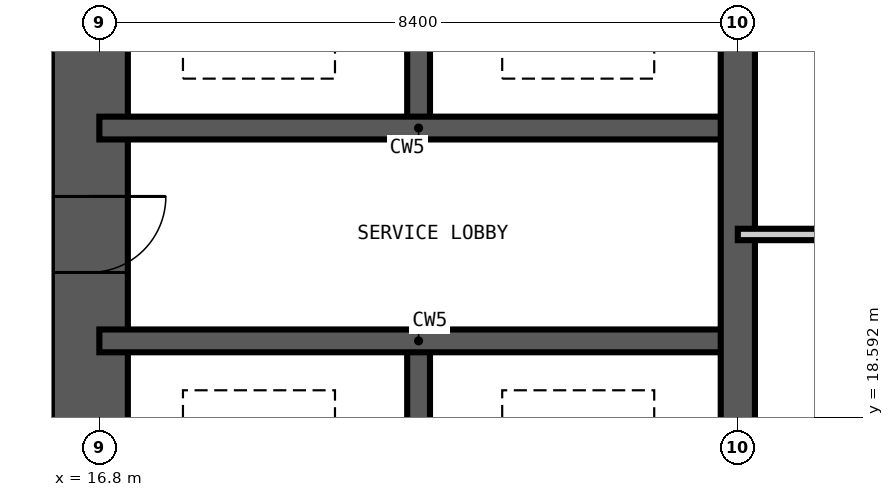
"""IFC4 building model, lengths in metres.
Left out: names, types, materials, properties, quantities, classifications, styles, units other than length and angle.
Written with IfcOpenShell. Run it as: python <this file> out.ifc"""

import sys

from ifc_helpers import new_model, si_unit, direction, frame, frame_2d, origin, place, context, subcontext, project, spatial, rectangle, extrude, element, fill, save


model = new_model("IFC4")
c1 = context("Model", 3, precision=1e-05, world=origin(), true_north=direction((0.0, 1.0)))
c2 = subcontext(c1, "Body", "Model", "MODEL_VIEW")
j1 = project(units=[si_unit("LENGTHUNIT", "METRE"), si_unit("PLANEANGLEUNIT", "RADIAN")], contexts=[c1])
p1 = place(None, origin())
s1 = spatial("IfcSite", under=j1, at=p1, CompositionType="ELEMENT")
p2 = place(p1, origin())
s2 = spatial("IfcBuilding", under=s1, at=p2, CompositionType="ELEMENT")
p3 = place(p2, frame((0.0, 0.0, 118.8)))
s3 = spatial("IfcBuildingStorey", under=s2, at=p3, CompositionType="ELEMENT", Elevation=118.8)
p4 = place(p3, frame((16.675, 41.625, -0.35), z_axis=(0.0, 0.0, 1.0), x_axis=(0.0, -1.0, 0.0)))
e1 = element("IfcWall", 1, at=p4, inside=s3, PredefinedType="SHEAR", context=c2, shape_type="SweptSolid", body=[
    extrude(rectangle(XDim=24.45, YDim=1.0, at=frame_2d((12.225, 0.0))), origin(), (0.0, 0.0, 1.0), 3.6),
])
p5 = place(p4, frame((11.325, 0.0, 0.35)))
e2 = element("IfcOpeningElement", 2, at=p5, cuts=e1, PredefinedType="OPENING", context=c2, shape_type="SweptSolid", body=[
    extrude(rectangle(XDim=1.8, YDim=2.2, at=frame_2d((0.9, 1.1))), frame((0.0, 0.51, 0.0), z_axis=(0.0, -1.0, 0.0), x_axis=(1.0, 0.0, 0.0)), (0.0, 0.0, 1.0), 1.02),
])
p6 = place(p4, frame((20.125, 0.0, 0.35)))
e3 = element("IfcOpeningElement", 3, at=p6, cuts=e1, PredefinedType="OPENING", context=c2, shape_type="SweptSolid", body=[
    extrude(rectangle(XDim=1.0, YDim=2.1, at=frame_2d((0.5, 1.05))), frame((0.0, 0.51, 0.0), z_axis=(0.0, -1.0, 0.0), x_axis=(1.0, 0.0, 0.0)), (0.0, 0.0, 1.0), 1.02),
])
p7 = place(p4, frame((5.425, 0.0, 0.35)))
e4 = element("IfcOpeningElement", 4, at=p7, cuts=e1, PredefinedType="OPENING", context=c2, shape_type="SweptSolid", body=[
    extrude(rectangle(XDim=1.0, YDim=2.1, at=frame_2d((0.5, 1.05))), frame((0.0, 0.51, 0.0), z_axis=(0.0, -1.0, 0.0), x_axis=(1.0, 0.0, 0.0)), (0.0, 0.0, 1.0), 1.02),
])
p8 = place(p3, frame((21.0, 16.8, -0.35), z_axis=(0.0, 0.0, 1.0), x_axis=(0.0, 1.0, 0.0)))
e5 = element("IfcWall", 5, at=p8, inside=s3, PredefinedType="SHEAR", context=c2, shape_type="SweptSolid", body=[
    extrude(rectangle(XDim=2.8, YDim=0.3, at=frame_2d((1.4, 0.0))), origin(), (0.0, 0.0, 1.0), 3.6),
])
p9 = place(p3, frame((21.0, 22.4, -0.35), z_axis=(0.0, 0.0, 1.0), x_axis=(0.0, 1.0, 0.0)))
e6 = element("IfcWall", 6, at=p9, inside=s3, PredefinedType="SHEAR", context=c2, shape_type="SweptSolid", body=[
    extrude(rectangle(XDim=5.6, YDim=0.3, at=frame_2d((2.8, 0.0))), origin(), (0.0, 0.0, 1.0), 3.6),
])
for number, where, z_axis, x_axis in (
    (7, (16.8, 19.6, -0.35), (0.0, 0.0, 1.0), (1.0, 0.0, 0.0)),
    (8, (16.8, 22.4, -0.35), (0.0, 0.0, 1.0), (1.0, 0.0, 0.0)),
):
    element("IfcWall", number, at=place(p3, frame(where, z_axis=z_axis, x_axis=x_axis)), inside=s3, PredefinedType="SHEAR", context=c2, shape_type="SweptSolid", body=[
        extrude(rectangle(XDim=8.4, YDim=0.3, at=frame_2d((4.2, 0.0))), origin(), (0.0, 0.0, 1.0), 3.6),
    ])
p10 = place(p3, frame((25.2, 16.8, -0.35), z_axis=(0.0, 0.0, 1.0), x_axis=(0.0, 1.0, 0.0)))
e9 = element("IfcWall", 9, at=p10, inside=s3, PredefinedType="SHEAR", context=c2, shape_type="SweptSolid", body=[
    extrude(rectangle(XDim=25.2, YDim=0.45, at=frame_2d((12.6, 0.0))), origin(), (0.0, 0.0, 1.0), 3.6),
])
p11 = place(p10, frame((12.1, 0.0, 0.35)))
e10 = element("IfcOpeningElement", 10, at=p11, cuts=e9, PredefinedType="OPENING", context=c2, shape_type="SweptSolid", body=[
    extrude(rectangle(XDim=1.0, YDim=2.1, at=frame_2d((0.5, 1.05))), frame((0.0, 0.235, 0.0), z_axis=(0.0, -1.0, 0.0), x_axis=(1.0, 0.0, 0.0)), (0.0, 0.0, 1.0), 0.47),
])
p12 = place(p3, frame((25.2, 21.0, 0.0), z_axis=(0.0, 0.0, 1.0), x_axis=(1.0, 0.0, 0.0)))
e11 = element("IfcWall", 11, at=p12, inside=s3, PredefinedType="PARTITIONING", context=c2, shape_type="SweptSolid", body=[
    extrude(rectangle(XDim=8.4, YDim=0.15, at=frame_2d((4.2, 0.0))), origin(), (0.0, 0.0, 1.0), 3.25),
])
p13 = place(p12, frame((3.7, 0.0, 0.0)))
e12 = element("IfcOpeningElement", 12, at=p13, cuts=e11, PredefinedType="OPENING", context=c2, shape_type="SweptSolid", body=[
    extrude(rectangle(XDim=1.0, YDim=2.1, at=frame_2d((0.5, 1.05))), frame((0.0, 0.085, 0.0), z_axis=(0.0, -1.0, 0.0), x_axis=(1.0, 0.0, 0.0)), (0.0, 0.0, 1.0), 0.17),
])
p14 = place(p6, origin())
e13 = element("IfcDoor", 13, at=p14, inside=s3, OperationType="SINGLE_SWING_LEFT", PredefinedType="DOOR", context=c2, shape_type="SweptSolid", body=[
    extrude(rectangle(XDim=1.0, YDim=2.1, at=frame_2d((0.5, 1.05))), frame((0.0, 0.025, 0.0), z_axis=(0.0, -1.0, 0.0), x_axis=(1.0, 0.0, 0.0)), (0.0, 0.0, 1.0), 0.05),
])
fill(e3, e13)
save(model, sys.argv[1])
